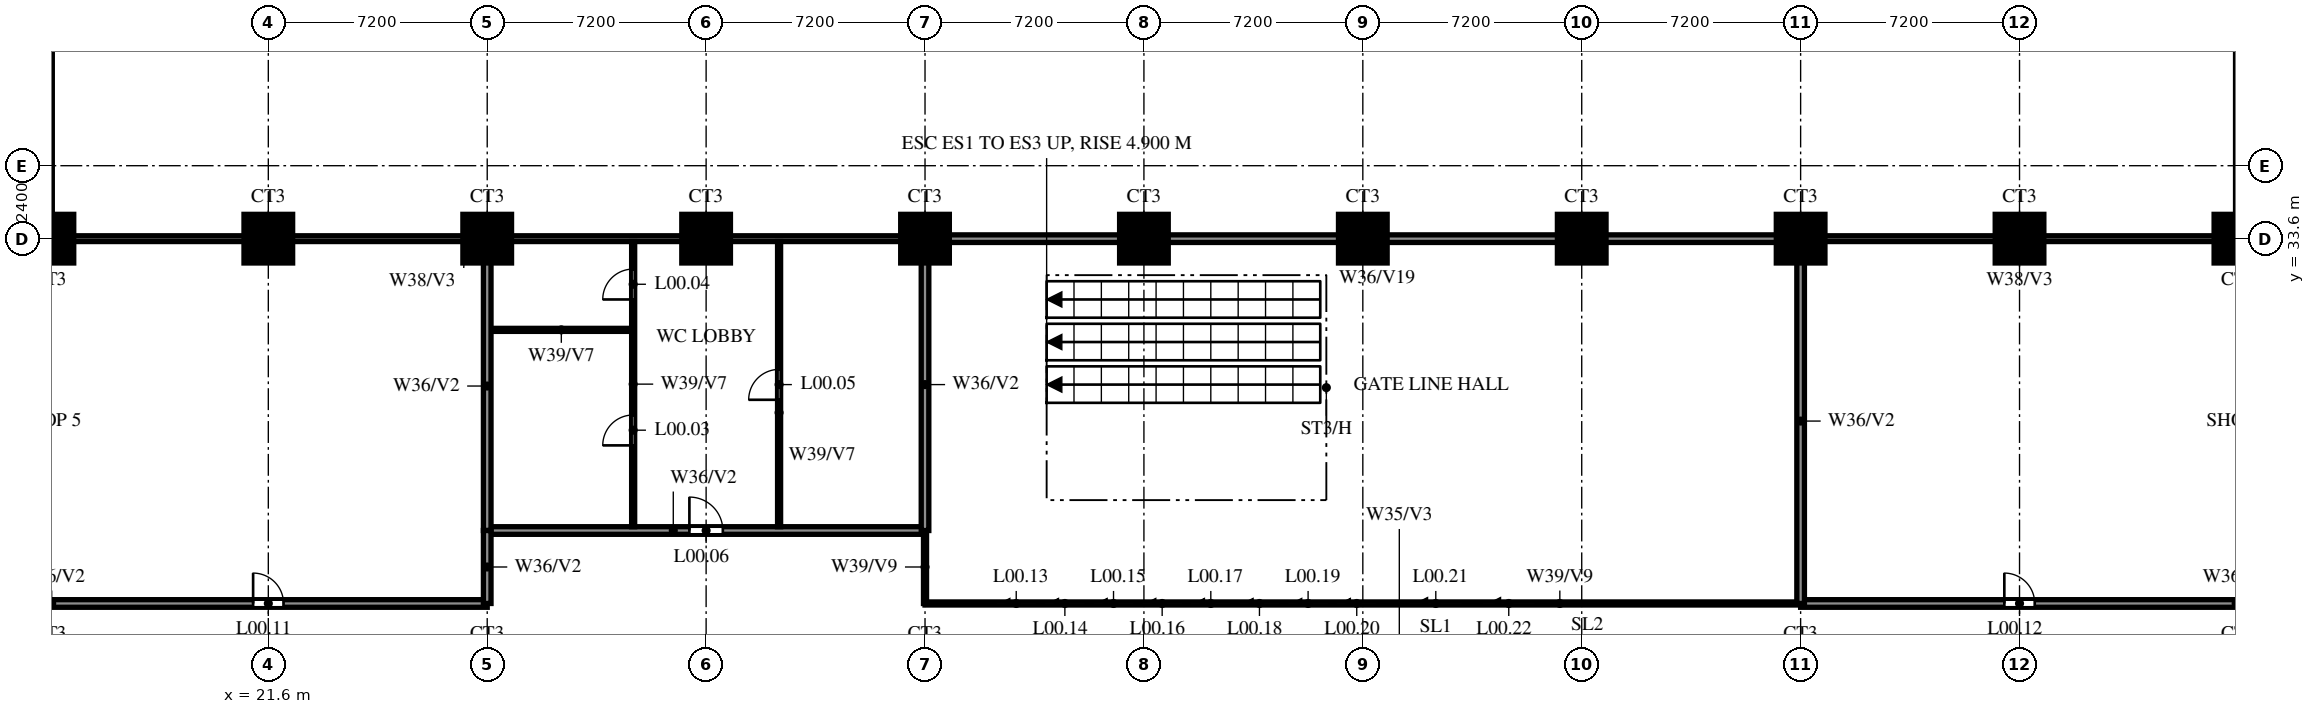
"""IFC4 building model, lengths in metres.
Left out: names, types, materials, properties, quantities, classifications, styles, units other than length and angle.
Written with IfcOpenShell. Run it as: python <this file> out.ifc"""

import sys

from ifc_helpers import new_model, si_unit, direction, frame, frame_2d, origin, origin_2d, place, context, subcontext, project, spatial, rectangle, circle, extrude, source, transform, mapped, element, fill, save


model = new_model("IFC4")
c1 = context("Model", 3, precision=1e-05, world=origin(), true_north=direction((0.0, 1.0)))
c2 = subcontext(c1, "Body", "Model", "MODEL_VIEW")
j1 = project(units=[si_unit("LENGTHUNIT", "METRE"), si_unit("PLANEANGLEUNIT", "RADIAN")], contexts=[c1])
p1 = place(None, origin())
s1 = spatial("IfcSite", under=j1, at=p1, CompositionType="ELEMENT")
p2 = place(p1, origin())
s2 = spatial("IfcBuilding", under=s1, at=p2, CompositionType="ELEMENT")
p3 = place(p2, origin())
s3 = spatial("IfcBuildingStorey", under=s2, at=p3, CompositionType="ELEMENT", Elevation=0.0)
m1 = source(origin(), c2, "Body", "SweptSolid", [
    extrude(circle(Radius=0.8, at=origin_2d()), origin(), (0.0, 0.0, 1.0), 7.4),
])
for number, where, z_axis, x_axis in (
    (1, (14.4, 33.6, 0.0), (0.0, 0.0, 1.0), (1.0, 0.0, 0.0)),
    (2, (21.6, 33.6, 0.0), (0.0, 0.0, 1.0), (1.0, 0.0, 0.0)),
    (3, (28.8, 33.6, 0.0), (0.0, 0.0, 1.0), (1.0, 0.0, 0.0)),
    (4, (36.0, 33.6, 0.0), (0.0, 0.0, 1.0), (1.0, 0.0, 0.0)),
    (5, (43.2, 33.6, 0.0), (0.0, 0.0, 1.0), (1.0, 0.0, 0.0)),
    (6, (50.4, 33.6, 0.0), (0.0, 0.0, 1.0), (1.0, 0.0, 0.0)),
    (7, (57.6, 33.6, 0.0), (0.0, 0.0, 1.0), (1.0, 0.0, 0.0)),
    (8, (64.8, 33.6, 0.0), (0.0, 0.0, 1.0), (1.0, 0.0, 0.0)),
    (9, (72.0, 33.6, 0.0), (0.0, 0.0, 1.0), (1.0, 0.0, 0.0)),
    (10, (79.2, 33.6, 0.0), (0.0, 0.0, 1.0), (1.0, 0.0, 0.0)),
    (11, (86.4, 33.6, 0.0), (0.0, 0.0, 1.0), (1.0, 0.0, 0.0)),
):
    element("IfcColumn", number, at=place(p3, frame(where, z_axis=z_axis, x_axis=x_axis)), inside=s3, PredefinedType="COLUMN", context=c2, shape_type="MappedRepresentation", body=[
        mapped(m1, transform((0.0, 0.0, 0.0))),
    ])
p4 = place(p3, frame((43.2, 21.6, 0.0), z_axis=(0.0, 0.0, 1.0), x_axis=(1.0, 0.0, 0.0)))
e12 = element("IfcWall", 12, at=p4, inside=s3, PredefinedType="PARTITIONING", context=c2, shape_type="SweptSolid", body=[
    extrude(rectangle(XDim=28.8, YDim=0.1, at=frame_2d((14.4, 0.0))), origin(), (0.0, 0.0, 1.0), 6.2),
])
p5 = place(p4, frame((2.3, 0.0, 0.0)))
e13 = element("IfcOpeningElement", 13, at=p5, cuts=e12, PredefinedType="OPENING", context=c2, shape_type="SweptSolid", body=[
    extrude(rectangle(XDim=1.4, YDim=2.1, at=frame_2d((0.7, 1.05))), frame((0.0, 0.06, 0.0), z_axis=(0.0, -1.0, 0.0), x_axis=(1.0, 0.0, 0.0)), (0.0, 0.0, 1.0), 0.12),
])
p6 = place(p4, frame((3.9, 0.0, 0.0)))
e14 = element("IfcOpeningElement", 14, at=p6, cuts=e12, PredefinedType="OPENING", context=c2, shape_type="SweptSolid", body=[
    extrude(rectangle(XDim=1.4, YDim=2.1, at=frame_2d((0.7, 1.05))), frame((0.0, 0.06, 0.0), z_axis=(0.0, -1.0, 0.0), x_axis=(1.0, 0.0, 0.0)), (0.0, 0.0, 1.0), 0.12),
])
p7 = place(p4, frame((5.5, 0.0, 0.0)))
e15 = element("IfcOpeningElement", 15, at=p7, cuts=e12, PredefinedType="OPENING", context=c2, shape_type="SweptSolid", body=[
    extrude(rectangle(XDim=1.4, YDim=2.1, at=frame_2d((0.7, 1.05))), frame((0.0, 0.06, 0.0), z_axis=(0.0, -1.0, 0.0), x_axis=(1.0, 0.0, 0.0)), (0.0, 0.0, 1.0), 0.12),
])
p8 = place(p4, frame((7.1, 0.0, 0.0)))
e16 = element("IfcOpeningElement", 16, at=p8, cuts=e12, PredefinedType="OPENING", context=c2, shape_type="SweptSolid", body=[
    extrude(rectangle(XDim=1.4, YDim=2.1, at=frame_2d((0.7, 1.05))), frame((0.0, 0.06, 0.0), z_axis=(0.0, -1.0, 0.0), x_axis=(1.0, 0.0, 0.0)), (0.0, 0.0, 1.0), 0.12),
])
p9 = place(p4, frame((8.7, 0.0, 0.0)))
e17 = element("IfcOpeningElement", 17, at=p9, cuts=e12, PredefinedType="OPENING", context=c2, shape_type="SweptSolid", body=[
    extrude(rectangle(XDim=1.4, YDim=2.1, at=frame_2d((0.7, 1.05))), frame((0.0, 0.06, 0.0), z_axis=(0.0, -1.0, 0.0), x_axis=(1.0, 0.0, 0.0)), (0.0, 0.0, 1.0), 0.12),
])
p10 = place(p4, frame((10.3, 0.0, 0.0)))
e18 = element("IfcOpeningElement", 18, at=p10, cuts=e12, PredefinedType="OPENING", context=c2, shape_type="SweptSolid", body=[
    extrude(rectangle(XDim=1.4, YDim=2.1, at=frame_2d((0.7, 1.05))), frame((0.0, 0.06, 0.0), z_axis=(0.0, -1.0, 0.0), x_axis=(1.0, 0.0, 0.0)), (0.0, 0.0, 1.0), 0.12),
])
p11 = place(p4, frame((11.9, 0.0, 0.0)))
e19 = element("IfcOpeningElement", 19, at=p11, cuts=e12, PredefinedType="OPENING", context=c2, shape_type="SweptSolid", body=[
    extrude(rectangle(XDim=1.4, YDim=2.1, at=frame_2d((0.7, 1.05))), frame((0.0, 0.06, 0.0), z_axis=(0.0, -1.0, 0.0), x_axis=(1.0, 0.0, 0.0)), (0.0, 0.0, 1.0), 0.12),
])
p12 = place(p4, frame((13.5, 0.0, 0.0)))
e20 = element("IfcOpeningElement", 20, at=p12, cuts=e12, PredefinedType="OPENING", context=c2, shape_type="SweptSolid", body=[
    extrude(rectangle(XDim=1.4, YDim=2.1, at=frame_2d((0.7, 1.05))), frame((0.0, 0.06, 0.0), z_axis=(0.0, -1.0, 0.0), x_axis=(1.0, 0.0, 0.0)), (0.0, 0.0, 1.0), 0.12),
])
p13 = place(p4, frame((15.9, 0.0, 0.0)))
e21 = element("IfcOpeningElement", 21, at=p13, cuts=e12, PredefinedType="OPENING", context=c2, shape_type="SweptSolid", body=[
    extrude(rectangle(XDim=1.8, YDim=2.1, at=frame_2d((0.9, 1.05))), frame((0.0, 0.06, 0.0), z_axis=(0.0, -1.0, 0.0), x_axis=(1.0, 0.0, 0.0)), (0.0, 0.0, 1.0), 0.12),
])
p14 = place(p4, frame((18.3, 0.0, 0.0)))
e22 = element("IfcOpeningElement", 22, at=p14, cuts=e12, PredefinedType="OPENING", context=c2, shape_type="SweptSolid", body=[
    extrude(rectangle(XDim=1.8, YDim=2.1, at=frame_2d((0.9, 1.05))), frame((0.0, 0.06, 0.0), z_axis=(0.0, -1.0, 0.0), x_axis=(1.0, 0.0, 0.0)), (0.0, 0.0, 1.0), 0.12),
])
p15 = place(p3, frame((0.15, 21.6, 0.0), z_axis=(0.0, 0.0, 1.0), x_axis=(1.0, 0.0, 0.0)))
e23 = element("IfcWall", 23, at=p15, inside=s3, PredefinedType="SOLIDWALL", context=c2, shape_type="SweptSolid", body=[
    extrude(rectangle(XDim=28.65, YDim=0.25, at=frame_2d((14.325, 0.0))), origin(), (0.0, 0.0, 1.0), 6.2),
])
p16 = place(p15, frame((20.95, 0.0, 0.0)))
e24 = element("IfcOpeningElement", 24, at=p16, cuts=e23, PredefinedType="OPENING", context=c2, shape_type="SweptSolid", body=[
    extrude(rectangle(XDim=1.0, YDim=2.1, at=frame_2d((0.5, 1.05))), frame((0.0, 0.135, 0.0), z_axis=(0.0, -1.0, 0.0), x_axis=(1.0, 0.0, 0.0)), (0.0, 0.0, 1.0), 0.27),
])
p17 = place(p3, frame((72.0, 21.6, 0.0), z_axis=(0.0, 0.0, 1.0), x_axis=(1.0, 0.0, 0.0)))
e25 = element("IfcWall", 25, at=p17, inside=s3, PredefinedType="SOLIDWALL", context=c2, shape_type="SweptSolid", body=[
    extrude(rectangle(XDim=28.65, YDim=0.25, at=frame_2d((14.325, 0.0))), origin(), (0.0, 0.0, 1.0), 6.2),
])
p18 = place(p17, frame((6.7, 0.0, 0.0)))
e26 = element("IfcOpeningElement", 26, at=p18, cuts=e25, PredefinedType="OPENING", context=c2, shape_type="SweptSolid", body=[
    extrude(rectangle(XDim=1.0, YDim=2.1, at=frame_2d((0.5, 1.05))), frame((0.0, 0.135, 0.0), z_axis=(0.0, -1.0, 0.0), x_axis=(1.0, 0.0, 0.0)), (0.0, 0.0, 1.0), 0.27),
])
p19 = place(p3, frame((28.8, 24.0, 0.0), z_axis=(0.0, 0.0, 1.0), x_axis=(1.0, 0.0, 0.0)))
e27 = element("IfcWall", 27, at=p19, inside=s3, PredefinedType="SOLIDWALL", context=c2, shape_type="SweptSolid", body=[
    extrude(rectangle(XDim=14.4, YDim=0.25, at=frame_2d((7.2, 0.0))), origin(), (0.0, 0.0, 1.0), 6.2),
])
p20 = place(p19, frame((6.65, 0.0, 0.0)))
e28 = element("IfcOpeningElement", 28, at=p20, cuts=e27, PredefinedType="OPENING", context=c2, shape_type="SweptSolid", body=[
    extrude(rectangle(XDim=1.1, YDim=2.1, at=frame_2d((0.55, 1.05))), frame((0.0, 0.135, 0.0), z_axis=(0.0, -1.0, 0.0), x_axis=(1.0, 0.0, 0.0)), (0.0, 0.0, 1.0), 0.27),
])
p21 = place(p3, frame((28.925, 30.6, 0.0), z_axis=(0.0, 0.0, 1.0), x_axis=(1.0, 0.0, 0.0)))
e29 = element("IfcWall", 29, at=p21, inside=s3, PredefinedType="PARTITIONING", context=c2, shape_type="SweptSolid", body=[
    extrude(rectangle(XDim=4.625, YDim=0.1, at=frame_2d((2.312, 0.0))), origin(), (0.0, 0.0, 1.0), 7.4),
])
p22 = place(p3, frame((14.4, 33.6, 0.0), z_axis=(0.0, 0.0, 1.0), x_axis=(1.0, 0.0, 0.0)))
e30 = element("IfcWall", 30, at=p22, inside=s3, PredefinedType="PARTITIONING", context=c2, shape_type="SweptSolid", body=[
    extrude(rectangle(XDim=28.8, YDim=0.19, at=frame_2d((14.4, 0.0))), origin(), (0.0, 0.0, 1.0), 6.5),
])
p23 = place(p3, frame((72.0, 33.6, 0.0), z_axis=(0.0, 0.0, 1.0), x_axis=(1.0, 0.0, 0.0)))
e31 = element("IfcWall", 31, at=p23, inside=s3, PredefinedType="PARTITIONING", context=c2, shape_type="SweptSolid", body=[
    extrude(rectangle(XDim=14.4, YDim=0.19, at=frame_2d((7.2, 0.0))), origin(), (0.0, 0.0, 1.0), 6.5),
])
p24 = place(p3, frame((43.2, 33.6, 0.0), z_axis=(0.0, 0.0, 1.0), x_axis=(1.0, 0.0, 0.0)))
e32 = element("IfcWall", 32, at=p24, inside=s3, PredefinedType="SOLIDWALL", context=c2, shape_type="SweptSolid", body=[
    extrude(rectangle(XDim=28.8, YDim=0.25, at=frame_2d((14.4, 0.0))), origin(), (0.0, 0.0, 1.0), 6.5),
])
p25 = place(p3, frame((28.8, 24.0, 0.0), z_axis=(0.0, 0.0, 1.0), x_axis=(0.0, 1.0, 0.0)))
e33 = element("IfcWall", 33, at=p25, inside=s3, PredefinedType="SOLIDWALL", context=c2, shape_type="SweptSolid", body=[
    extrude(rectangle(XDim=9.505, YDim=0.25, at=frame_2d((4.752, 0.0))), origin(), (0.0, 0.0, 1.0), 6.2),
])
p26 = place(p3, frame((28.8, 21.6, 0.0), z_axis=(0.0, 0.0, 1.0), x_axis=(0.0, 1.0, 0.0)))
e34 = element("IfcWall", 34, at=p26, inside=s3, PredefinedType="SOLIDWALL", context=c2, shape_type="SweptSolid", body=[
    extrude(rectangle(XDim=2.4, YDim=0.25, at=frame_2d((1.2, 0.0))), origin(), (0.0, 0.0, 1.0), 6.2),
])
p27 = place(p3, frame((33.6, 24.125, 0.0), z_axis=(0.0, 0.0, 1.0), x_axis=(0.0, 1.0, 0.0)))
e35 = element("IfcWall", 35, at=p27, inside=s3, PredefinedType="PARTITIONING", context=c2, shape_type="SweptSolid", body=[
    extrude(rectangle(XDim=9.38, YDim=0.1, at=frame_2d((4.69, 0.0))), origin(), (0.0, 0.0, 1.0), 7.4),
])
p28 = place(p27, frame((2.675, 0.0, 0.0)))
e36 = element("IfcOpeningElement", 36, at=p28, cuts=e35, PredefinedType="OPENING", context=c2, shape_type="SweptSolid", body=[
    extrude(rectangle(XDim=1.0, YDim=2.1, at=frame_2d((0.5, 1.05))), frame((0.0, 0.06, 0.0), z_axis=(0.0, -1.0, 0.0), x_axis=(1.0, 0.0, 0.0)), (0.0, 0.0, 1.0), 0.12),
])
p29 = place(p27, frame((7.475, 0.0, 0.0)))
e37 = element("IfcOpeningElement", 37, at=p29, cuts=e35, PredefinedType="OPENING", context=c2, shape_type="SweptSolid", body=[
    extrude(rectangle(XDim=1.0, YDim=2.1, at=frame_2d((0.5, 1.05))), frame((0.0, 0.06, 0.0), z_axis=(0.0, -1.0, 0.0), x_axis=(1.0, 0.0, 0.0)), (0.0, 0.0, 1.0), 0.12),
])
p30 = place(p3, frame((38.4, 24.125, 0.0), z_axis=(0.0, 0.0, 1.0), x_axis=(0.0, 1.0, 0.0)))
e38 = element("IfcWall", 38, at=p30, inside=s3, PredefinedType="PARTITIONING", context=c2, shape_type="SweptSolid", body=[
    extrude(rectangle(XDim=9.38, YDim=0.1, at=frame_2d((4.69, 0.0))), origin(), (0.0, 0.0, 1.0), 7.4),
])
p31 = place(p30, frame((4.175, 0.0, 0.0)))
e39 = element("IfcOpeningElement", 39, at=p31, cuts=e38, PredefinedType="OPENING", context=c2, shape_type="SweptSolid", body=[
    extrude(rectangle(XDim=1.0, YDim=2.1, at=frame_2d((0.5, 1.05))), frame((0.0, 0.06, 0.0), z_axis=(0.0, -1.0, 0.0), x_axis=(1.0, 0.0, 0.0)), (0.0, 0.0, 1.0), 0.12),
])
p32 = place(p3, frame((43.2, 21.6, 0.0), z_axis=(0.0, 0.0, 1.0), x_axis=(0.0, 1.0, 0.0)))
e40 = element("IfcWall", 40, at=p32, inside=s3, PredefinedType="PARTITIONING", context=c2, shape_type="SweptSolid", body=[
    extrude(rectangle(XDim=2.4, YDim=0.1, at=frame_2d((1.2, 0.0))), origin(), (0.0, 0.0, 1.0), 6.2),
])
p33 = place(p3, frame((43.2, 24.0, 0.0), z_axis=(0.0, 0.0, 1.0), x_axis=(0.0, 1.0, 0.0)))
e41 = element("IfcWall", 41, at=p33, inside=s3, PredefinedType="SOLIDWALL", context=c2, shape_type="SweptSolid", body=[
    extrude(rectangle(XDim=9.6, YDim=0.25, at=frame_2d((4.8, 0.0))), origin(), (0.0, 0.0, 1.0), 6.2),
])
p34 = place(p3, frame((72.0, 21.6, 0.0), z_axis=(0.0, 0.0, 1.0), x_axis=(0.0, 1.0, 0.0)))
e42 = element("IfcWall", 42, at=p34, inside=s3, PredefinedType="SOLIDWALL", context=c2, shape_type="SweptSolid", body=[
    extrude(rectangle(XDim=12.0, YDim=0.25, at=frame_2d((6.0, 0.0))), origin(), (0.0, 0.0, 1.0), 6.2),
])
p35 = place(p28, origin())
e43 = element("IfcDoor", 43, at=p35, inside=s3, OperationType="SINGLE_SWING_LEFT", PredefinedType="DOOR", context=c2, shape_type="SweptSolid", body=[
    extrude(rectangle(XDim=1.0, YDim=2.1, at=frame_2d((0.5, 1.05))), frame((0.0, 0.025, 0.0), z_axis=(0.0, -1.0, 0.0), x_axis=(1.0, 0.0, 0.0)), (0.0, 0.0, 1.0), 0.05),
])
fill(e36, e43)
p36 = place(p29, origin())
e44 = element("IfcDoor", 44, at=p36, inside=s3, OperationType="SINGLE_SWING_RIGHT", PredefinedType="DOOR", context=c2, shape_type="SweptSolid", body=[
    extrude(rectangle(XDim=1.0, YDim=2.1, at=frame_2d((0.5, 1.05))), frame((0.0, 0.025, 0.0), z_axis=(0.0, -1.0, 0.0), x_axis=(1.0, 0.0, 0.0)), (0.0, 0.0, 1.0), 0.05),
])
fill(e37, e44)
p37 = place(p31, origin())
e45 = element("IfcDoor", 45, at=p37, inside=s3, OperationType="SINGLE_SWING_LEFT", PredefinedType="DOOR", context=c2, shape_type="SweptSolid", body=[
    extrude(rectangle(XDim=1.0, YDim=2.1, at=frame_2d((0.5, 1.05))), frame((0.0, 0.025, 0.0), z_axis=(0.0, -1.0, 0.0), x_axis=(1.0, 0.0, 0.0)), (0.0, 0.0, 1.0), 0.05),
])
fill(e39, e45)
p38 = place(p20, origin())
e46 = element("IfcDoor", 46, at=p38, inside=s3, OperationType="SINGLE_SWING_LEFT", PredefinedType="DOOR", context=c2, shape_type="SweptSolid", body=[
    extrude(rectangle(XDim=1.1, YDim=2.1, at=frame_2d((0.55, 1.05))), frame((0.0, 0.025, 0.0), z_axis=(0.0, -1.0, 0.0), x_axis=(1.0, 0.0, 0.0)), (0.0, 0.0, 1.0), 0.05),
])
fill(e28, e46)
p39 = place(p16, origin())
e47 = element("IfcDoor", 47, at=p39, inside=s3, OperationType="SINGLE_SWING_RIGHT", PredefinedType="DOOR", context=c2, shape_type="SweptSolid", body=[
    extrude(rectangle(XDim=1.0, YDim=2.1, at=frame_2d((0.5, 1.05))), frame((0.0, 0.025, 0.0), z_axis=(0.0, -1.0, 0.0), x_axis=(1.0, 0.0, 0.0)), (0.0, 0.0, 1.0), 0.05),
])
fill(e24, e47)
p40 = place(p18, origin())
e48 = element("IfcDoor", 48, at=p40, inside=s3, OperationType="SINGLE_SWING_LEFT", PredefinedType="DOOR", context=c2, shape_type="SweptSolid", body=[
    extrude(rectangle(XDim=1.0, YDim=2.1, at=frame_2d((0.5, 1.05))), frame((0.0, 0.025, 0.0), z_axis=(0.0, -1.0, 0.0), x_axis=(1.0, 0.0, 0.0)), (0.0, 0.0, 1.0), 0.05),
])
fill(e26, e48)
p41 = place(p5, origin())
e49 = element("IfcDoor", 49, at=p41, inside=s3, OperationType="SLIDING_TO_LEFT", PredefinedType="GATE", context=c2, shape_type="SweptSolid", body=[
    extrude(rectangle(XDim=1.4, YDim=2.1, at=frame_2d((0.7, 1.05))), frame((0.0, 0.025, 0.0), z_axis=(0.0, -1.0, 0.0), x_axis=(1.0, 0.0, 0.0)), (0.0, 0.0, 1.0), 0.05),
])
fill(e13, e49)
p42 = place(p6, origin())
e50 = element("IfcDoor", 50, at=p42, inside=s3, OperationType="SLIDING_TO_LEFT", PredefinedType="GATE", context=c2, shape_type="SweptSolid", body=[
    extrude(rectangle(XDim=1.4, YDim=2.1, at=frame_2d((0.7, 1.05))), frame((0.0, 0.025, 0.0), z_axis=(0.0, -1.0, 0.0), x_axis=(1.0, 0.0, 0.0)), (0.0, 0.0, 1.0), 0.05),
])
fill(e14, e50)
p43 = place(p7, origin())
e51 = element("IfcDoor", 51, at=p43, inside=s3, OperationType="SLIDING_TO_LEFT", PredefinedType="GATE", context=c2, shape_type="SweptSolid", body=[
    extrude(rectangle(XDim=1.4, YDim=2.1, at=frame_2d((0.7, 1.05))), frame((0.0, 0.025, 0.0), z_axis=(0.0, -1.0, 0.0), x_axis=(1.0, 0.0, 0.0)), (0.0, 0.0, 1.0), 0.05),
])
fill(e15, e51)
p44 = place(p8, origin())
e52 = element("IfcDoor", 52, at=p44, inside=s3, OperationType="SLIDING_TO_LEFT", PredefinedType="GATE", context=c2, shape_type="SweptSolid", body=[
    extrude(rectangle(XDim=1.4, YDim=2.1, at=frame_2d((0.7, 1.05))), frame((0.0, 0.025, 0.0), z_axis=(0.0, -1.0, 0.0), x_axis=(1.0, 0.0, 0.0)), (0.0, 0.0, 1.0), 0.05),
])
fill(e16, e52)
p45 = place(p9, origin())
e53 = element("IfcDoor", 53, at=p45, inside=s3, OperationType="SLIDING_TO_LEFT", PredefinedType="GATE", context=c2, shape_type="SweptSolid", body=[
    extrude(rectangle(XDim=1.4, YDim=2.1, at=frame_2d((0.7, 1.05))), frame((0.0, 0.025, 0.0), z_axis=(0.0, -1.0, 0.0), x_axis=(1.0, 0.0, 0.0)), (0.0, 0.0, 1.0), 0.05),
])
fill(e17, e53)
p46 = place(p10, origin())
e54 = element("IfcDoor", 54, at=p46, inside=s3, OperationType="SLIDING_TO_LEFT", PredefinedType="GATE", context=c2, shape_type="SweptSolid", body=[
    extrude(rectangle(XDim=1.4, YDim=2.1, at=frame_2d((0.7, 1.05))), frame((0.0, 0.025, 0.0), z_axis=(0.0, -1.0, 0.0), x_axis=(1.0, 0.0, 0.0)), (0.0, 0.0, 1.0), 0.05),
])
fill(e18, e54)
p47 = place(p11, origin())
e55 = element("IfcDoor", 55, at=p47, inside=s3, OperationType="SLIDING_TO_LEFT", PredefinedType="GATE", context=c2, shape_type="SweptSolid", body=[
    extrude(rectangle(XDim=1.4, YDim=2.1, at=frame_2d((0.7, 1.05))), frame((0.0, 0.025, 0.0), z_axis=(0.0, -1.0, 0.0), x_axis=(1.0, 0.0, 0.0)), (0.0, 0.0, 1.0), 0.05),
])
fill(e19, e55)
p48 = place(p12, origin())
e56 = element("IfcDoor", 56, at=p48, inside=s3, OperationType="SLIDING_TO_LEFT", PredefinedType="GATE", context=c2, shape_type="SweptSolid", body=[
    extrude(rectangle(XDim=1.4, YDim=2.1, at=frame_2d((0.7, 1.05))), frame((0.0, 0.025, 0.0), z_axis=(0.0, -1.0, 0.0), x_axis=(1.0, 0.0, 0.0)), (0.0, 0.0, 1.0), 0.05),
])
fill(e20, e56)
p49 = place(p13, origin())
e57 = element("IfcDoor", 57, at=p49, inside=s3, OperationType="SLIDING_TO_LEFT", PredefinedType="GATE", context=c2, shape_type="SweptSolid", body=[
    extrude(rectangle(XDim=1.8, YDim=2.1, at=frame_2d((0.9, 1.05))), frame((0.0, 0.025, 0.0), z_axis=(0.0, -1.0, 0.0), x_axis=(1.0, 0.0, 0.0)), (0.0, 0.0, 1.0), 0.05),
])
fill(e21, e57)
p50 = place(p14, origin())
e58 = element("IfcDoor", 58, at=p50, inside=s3, OperationType="SLIDING_TO_LEFT", PredefinedType="GATE", context=c2, shape_type="SweptSolid", body=[
    extrude(rectangle(XDim=1.8, YDim=2.1, at=frame_2d((0.9, 1.05))), frame((0.0, 0.025, 0.0), z_axis=(0.0, -1.0, 0.0), x_axis=(1.0, 0.0, 0.0)), (0.0, 0.0, 1.0), 0.05),
])
fill(e22, e58)
save(model, sys.argv[1])
